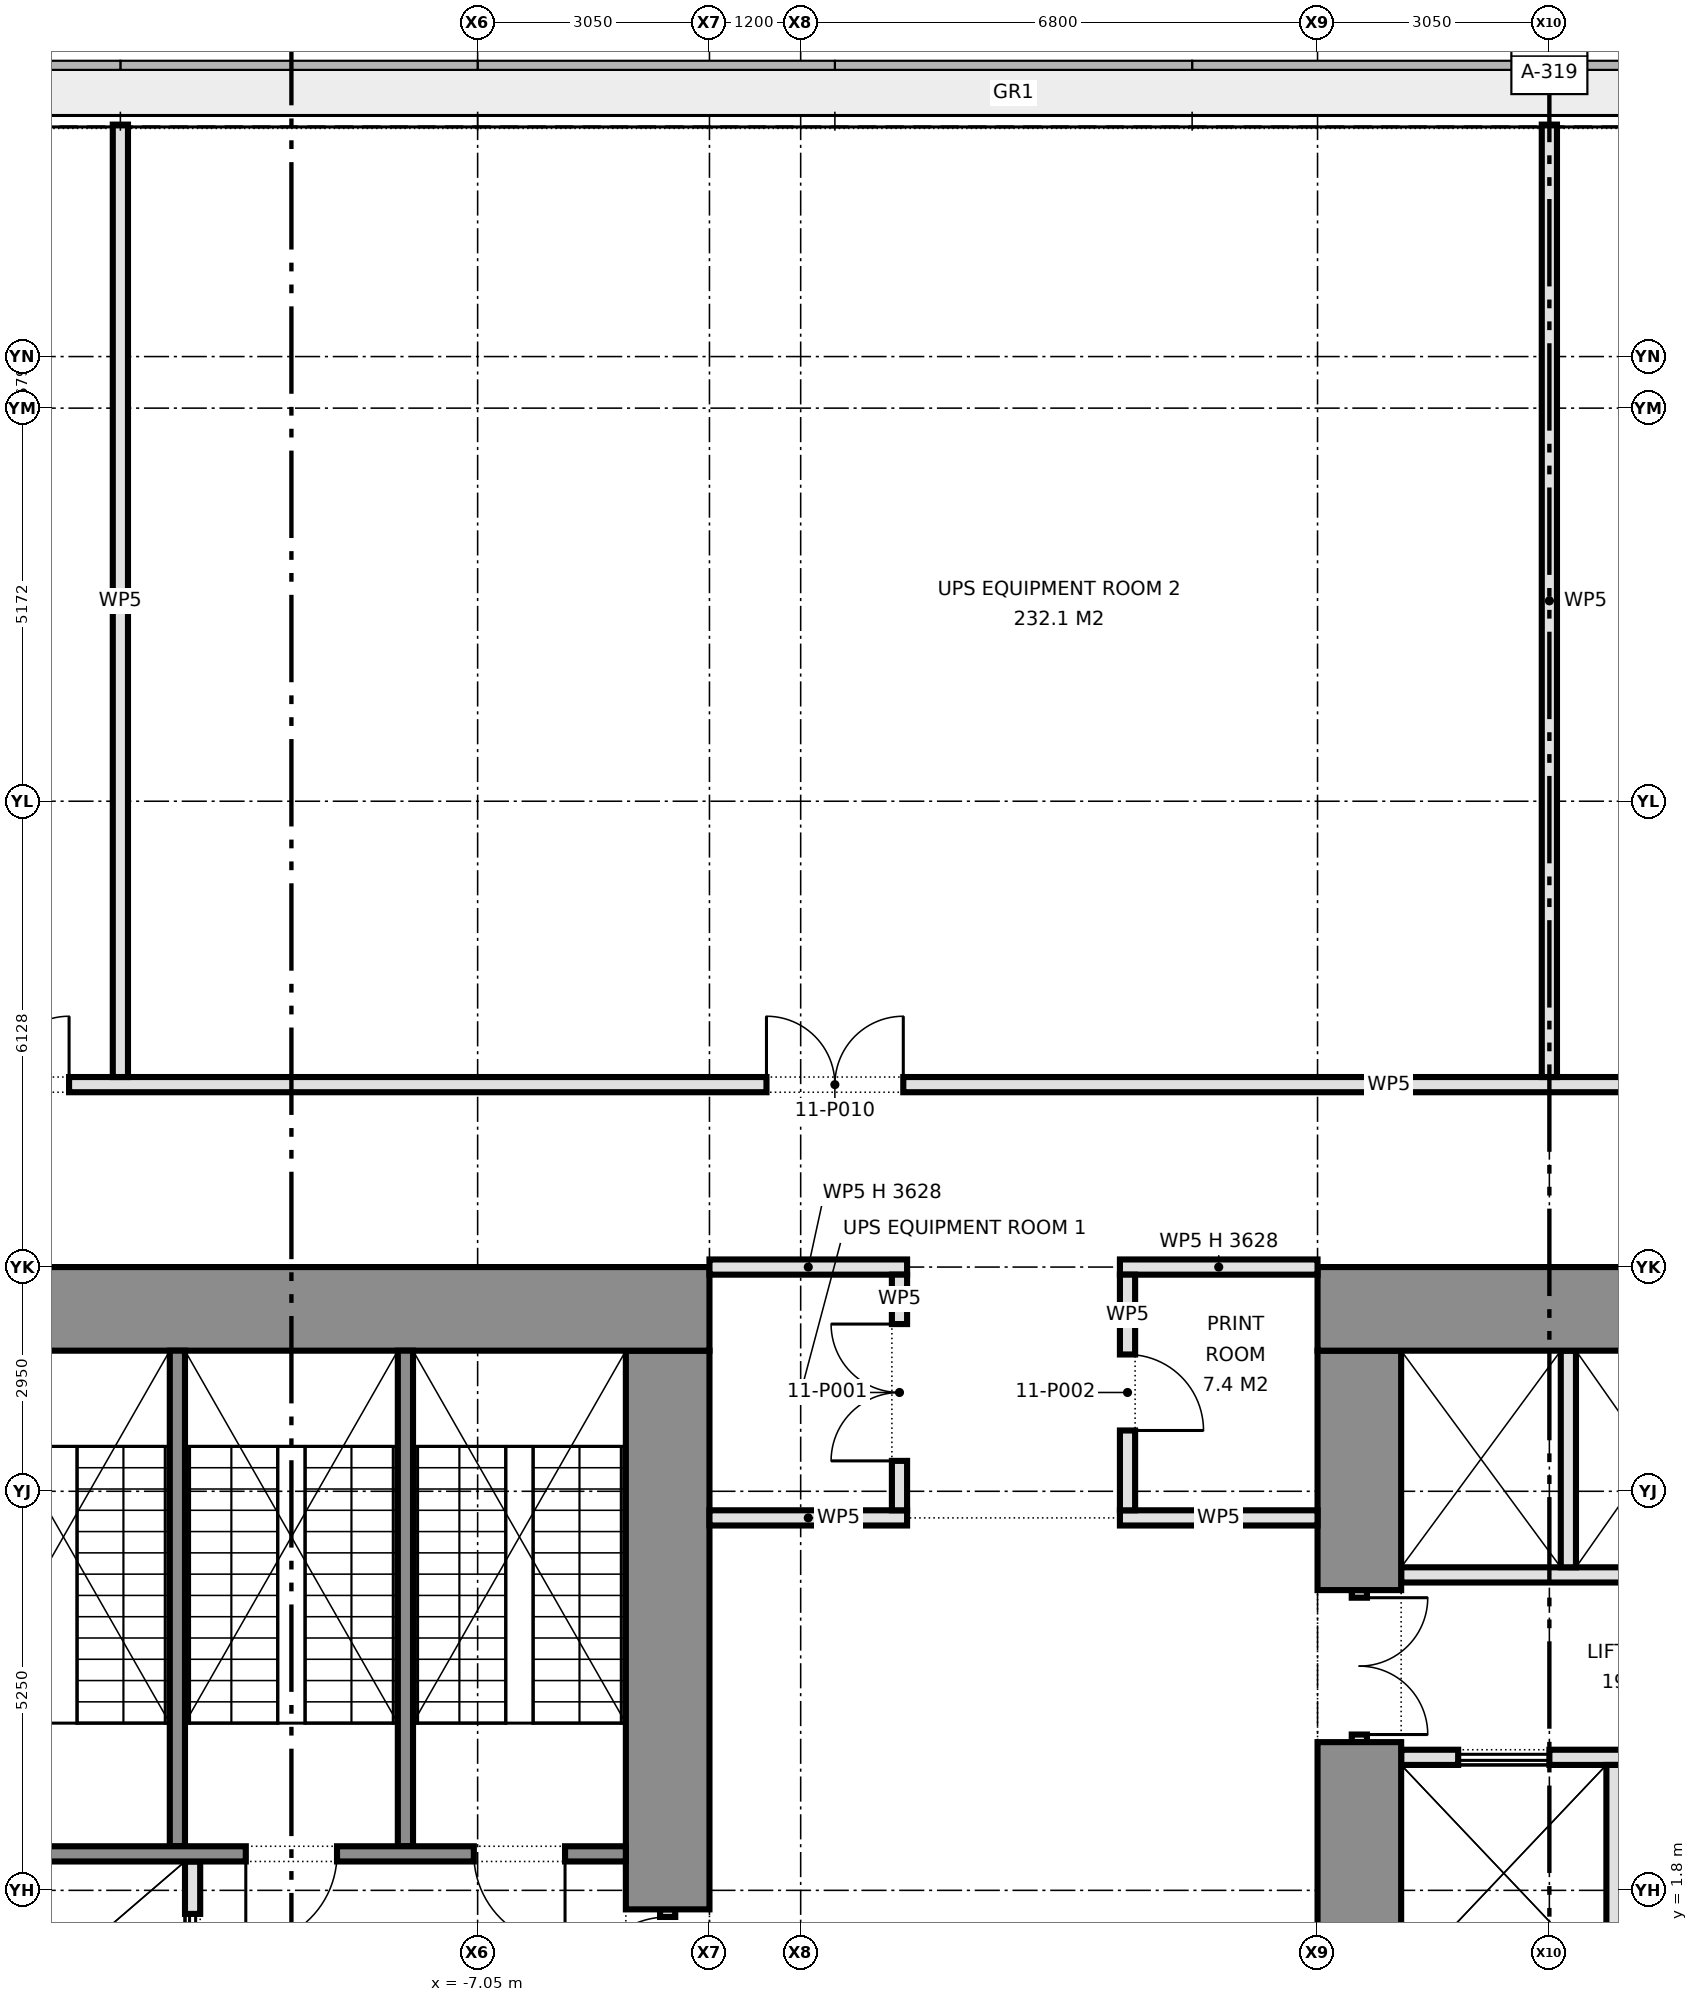
"""IFC4 building model, lengths in metres.
Left out: names, types, materials, properties, quantities, classifications, styles, units other than length and angle.
Written with IfcOpenShell. Run it as: python <this file> out.ifc"""

import sys

from ifc_helpers import new_model, si_unit, direction, frame, frame_2d, origin, place, context, subcontext, project, spatial, rectangle, extrude, element, fill, save


model = new_model("IFC4")
c1 = context("Model", 3, precision=1e-05, world=origin(), true_north=direction((0.0, 1.0)))
c2 = subcontext(c1, "Body", "Model", "MODEL_VIEW")
j1 = project(units=[si_unit("LENGTHUNIT", "METRE"), si_unit("PLANEANGLEUNIT", "RADIAN")], contexts=[c1])
p1 = place(None, origin())
s1 = spatial("IfcSite", under=j1, at=p1, CompositionType="ELEMENT")
p2 = place(p1, origin())
s2 = spatial("IfcBuilding", under=s1, at=p2, CompositionType="ELEMENT")
p3 = place(p2, frame((0.0, 0.0, 49.7)))
s3 = spatial("IfcBuildingStorey", under=s2, at=p3, CompositionType="ELEMENT", Elevation=49.7)
p4 = place(p3, frame((-15.0, 9.45, 0.0), z_axis=(0.0, 0.0, 1.0), x_axis=(1.0, 0.0, 0.0)))
e1 = element("IfcWall", 1, at=p4, inside=s3, PredefinedType="SHEAR", context=c2, shape_type="SweptSolid", body=[
    extrude(rectangle(XDim=11.0, YDim=1.1, at=frame_2d((5.5, 0.0))), origin(), (0.0, 0.0, 1.0), 4.575),
])
p5 = place(p3, frame((-4.55, 0.25, 0.0), z_axis=(0.0, 0.0, 1.0), x_axis=(0.0, 1.0, 0.0)))
e2 = element("IfcWall", 2, at=p5, inside=s3, PredefinedType="PARTITIONING", context=c2, shape_type="SweptSolid", body=[
    extrude(rectangle(XDim=1.3, YDim=0.2, at=frame_2d((0.65, 0.0))), origin(), (0.0, 0.0, 1.0), 2.4),
])
p6 = place(p5, frame((0.1, 0.0, 0.0)))
e3 = element("IfcOpeningElement", 3, at=p6, cuts=e2, PredefinedType="OPENING", context=c2, shape_type="SweptSolid", body=[
    extrude(rectangle(XDim=1.1, YDim=2.1, at=frame_2d((0.55, 1.05))), frame((0.0, 0.11, 0.0), z_axis=(0.0, -1.0, 0.0), x_axis=(1.0, 0.0, 0.0)), (0.0, 0.0, 1.0), 0.22),
])
p7 = place(p3, frame((-4.55, 1.55, 0.0), z_axis=(0.0, 0.0, 1.0), x_axis=(0.0, 1.0, 0.0)))
e4 = element("IfcWall", 4, at=p7, inside=s3, PredefinedType="SHEAR", context=c2, shape_type="SweptSolid", body=[
    extrude(rectangle(XDim=7.35, YDim=1.1, at=frame_2d((3.675, 0.0))), origin(), (0.0, 0.0, 1.0), 4.575),
])
p8 = place(p3, frame((-10.8, -0.4, 0.0), z_axis=(0.0, 0.0, 1.0), x_axis=(0.0, 1.0, 0.0)))
e5 = element("IfcWall", 5, at=p8, inside=s3, PredefinedType="PARTITIONING", context=c2, shape_type="SweptSolid", body=[
    extrude(rectangle(XDim=2.58, YDim=0.2, at=frame_2d((1.29, 0.0))), origin(), (0.0, 0.0, 1.0), 4.575),
])
p9 = place(p8, frame((0.69, 0.0, 0.0)))
e6 = element("IfcOpeningElement", 6, at=p9, cuts=e5, PredefinedType="OPENING", context=c2, shape_type="SweptSolid", body=[
    extrude(rectangle(XDim=1.2, YDim=2.1, at=frame_2d((0.6, 1.05))), frame((0.0, 0.11, 0.0), z_axis=(0.0, -1.0, 0.0), x_axis=(1.0, 0.0, 0.0)), (0.0, 0.0, 1.0), 0.22),
])
p10 = place(p3, frame((-13.9, 2.28, 0.0), z_axis=(0.0, 0.0, 1.0), x_axis=(1.0, 0.0, 0.0)))
e7 = element("IfcWall", 7, at=p10, inside=s3, PredefinedType="SHEAR", context=c2, shape_type="SweptSolid", body=[
    extrude(rectangle(XDim=8.8, YDim=0.2, at=frame_2d((4.4, 0.0))), origin(), (0.0, 0.0, 1.0), 4.575),
])
p11 = place(p10, frame((3.8, 0.0, 0.0)))
e8 = element("IfcOpeningElement", 8, at=p11, cuts=e7, PredefinedType="OPENING", context=c2, shape_type="SweptSolid", body=[
    extrude(rectangle(XDim=1.2, YDim=2.1, at=frame_2d((0.6, 1.05))), frame((0.0, 0.11, 0.0), z_axis=(0.0, -1.0, 0.0), x_axis=(1.0, 0.0, 0.0)), (0.0, 0.0, 1.0), 0.22),
])
p12 = place(p10, frame((6.8, 0.0, 0.0)))
e9 = element("IfcOpeningElement", 9, at=p12, cuts=e7, PredefinedType="OPENING", context=c2, shape_type="SweptSolid", body=[
    extrude(rectangle(XDim=1.2, YDim=2.1, at=frame_2d((0.6, 1.05))), frame((0.0, 0.11, 0.0), z_axis=(0.0, -1.0, 0.0), x_axis=(1.0, 0.0, 0.0)), (0.0, 0.0, 1.0), 0.22),
])
for number, where, z_axis, x_axis in (
    (10, (-11.0, 2.38, 0.0), (0.0, 0.0, 1.0), (0.0, 1.0, 0.0)),
    (11, (-8.0, 2.38, 0.0), (0.0, 0.0, 1.0), (0.0, 1.0, 0.0)),
):
    element("IfcWall", number, at=place(p3, frame(where, z_axis=z_axis, x_axis=x_axis)), inside=s3, PredefinedType="SHEAR", context=c2, shape_type="SweptSolid", body=[
        extrude(rectangle(XDim=6.52, YDim=0.2, at=frame_2d((3.26, 0.0))), origin(), (0.0, 0.0, 1.0), 4.575),
    ])
p13 = place(p3, frame((15.0, 9.45, 0.0), z_axis=(0.0, 0.0, 1.0), x_axis=(-1.0, 0.0, 0.0)))
e12 = element("IfcWall", 12, at=p13, inside=s3, PredefinedType="SHEAR", context=c2, shape_type="SweptSolid", body=[
    extrude(rectangle(XDim=11.0, YDim=1.1, at=frame_2d((5.5, 0.0))), origin(), (0.0, 0.0, 1.0), 4.575),
])
p14 = place(p3, frame((4.55, 8.9, 0.0), z_axis=(0.0, 0.0, 1.0), x_axis=(0.0, -1.0, 0.0)))
e13 = element("IfcWall", 13, at=p14, inside=s3, PredefinedType="SHEAR", context=c2, shape_type="SweptSolid", body=[
    extrude(rectangle(XDim=3.15, YDim=1.1, at=frame_2d((1.575, 0.0))), origin(), (0.0, 0.0, 1.0), 4.575),
])
p15 = place(p3, frame((4.55, 5.75, 0.0), z_axis=(0.0, 0.0, 1.0), x_axis=(0.0, -1.0, 0.0)))
e14 = element("IfcWall", 14, at=p15, inside=s3, PredefinedType="PARTITIONING", context=c2, shape_type="SweptSolid", body=[
    extrude(rectangle(XDim=2.0, YDim=0.2, at=frame_2d((1.0, 0.0))), origin(), (0.0, 0.0, 1.0), 2.4),
])
p16 = place(p15, frame((0.1, 0.0, 0.0)))
e15 = element("IfcOpeningElement", 15, at=p16, cuts=e14, PredefinedType="OPENING", context=c2, shape_type="SweptSolid", body=[
    extrude(rectangle(XDim=1.8, YDim=2.1, at=frame_2d((0.9, 1.05))), frame((0.0, 0.11, 0.0), z_axis=(0.0, -1.0, 0.0), x_axis=(1.0, 0.0, 0.0)), (0.0, 0.0, 1.0), 0.22),
])
p17 = place(p3, frame((4.55, 3.75, 0.0), z_axis=(0.0, 0.0, 1.0), x_axis=(0.0, -1.0, 0.0)))
e16 = element("IfcWall", 16, at=p17, inside=s3, PredefinedType="SHEAR", context=c2, shape_type="SweptSolid", body=[
    extrude(rectangle(XDim=4.0, YDim=1.1, at=frame_2d((2.0, 0.0))), origin(), (0.0, 0.0, 1.0), 4.575),
])
p18 = place(p3, frame((13.9, 5.95, 0.0), z_axis=(0.0, 0.0, 1.0), x_axis=(-1.0, 0.0, 0.0)))
e17 = element("IfcWall", 17, at=p18, inside=s3, PredefinedType="PARTITIONING", context=c2, shape_type="SweptSolid", body=[
    extrude(rectangle(XDim=8.8, YDim=0.2, at=frame_2d((4.4, 0.0))), origin(), (0.0, 0.0, 1.0), 4.575),
])
p19 = place(p18, frame((1.7, 0.0, 0.0)))
e18 = element("IfcOpeningElement", 18, at=p19, cuts=e17, PredefinedType="OPENING", context=c2, shape_type="SweptSolid", body=[
    extrude(rectangle(XDim=0.9, YDim=2.1, at=frame_2d((0.45, 1.05))), frame((0.0, 0.11, 0.0), z_axis=(0.0, -1.0, 0.0), x_axis=(1.0, 0.0, 0.0)), (0.0, 0.0, 1.0), 0.22),
])
p20 = place(p3, frame((13.9, 3.55, 0.0), z_axis=(0.0, 0.0, 1.0), x_axis=(-1.0, 0.0, 0.0)))
e19 = element("IfcWall", 19, at=p20, inside=s3, PredefinedType="PARTITIONING", context=c2, shape_type="SweptSolid", body=[
    extrude(rectangle(XDim=8.8, YDim=0.2, at=frame_2d((4.4, 0.0))), origin(), (0.0, 0.0, 1.0), 4.575),
])
p21 = place(p20, frame((0.65, 0.0, 0.0)))
e20 = element("IfcOpeningElement", 20, at=p21, cuts=e19, PredefinedType="OPENING", context=c2, shape_type="SweptSolid", body=[
    extrude(rectangle(XDim=1.8, YDim=2.1, at=frame_2d((0.9, 1.05))), frame((0.0, 0.11, 0.0), z_axis=(0.0, -1.0, 0.0), x_axis=(1.0, 0.0, 0.0)), (0.0, 0.0, 1.0), 0.22),
])
p22 = place(p20, frame((4.0, 0.0, 0.0)))
e21 = element("IfcOpeningElement", 21, at=p22, cuts=e19, PredefinedType="OPENING", context=c2, shape_type="SweptSolid", body=[
    extrude(rectangle(XDim=1.2, YDim=2.1, at=frame_2d((0.6, 1.05))), frame((0.0, 0.11, 0.0), z_axis=(0.0, -1.0, 0.0), x_axis=(1.0, 0.0, 0.0)), (0.0, 0.0, 1.0), 0.22),
])
p23 = place(p20, frame((6.85, 0.0, 0.0)))
e22 = element("IfcOpeningElement", 22, at=p23, cuts=e19, PredefinedType="OPENING", context=c2, shape_type="SweptSolid", body=[
    extrude(rectangle(XDim=1.2, YDim=2.1, at=frame_2d((0.6, 1.05))), frame((0.0, 0.11, 0.0), z_axis=(0.0, -1.0, 0.0), x_axis=(1.0, 0.0, 0.0)), (0.0, 0.0, 1.0), 0.22),
])
for number, where, z_axis, x_axis in (
    (23, (7.3, 8.9, 0.0), (0.0, 0.0, 1.0), (0.0, -1.0, 0.0)),
    (24, (7.9, 3.45, 0.0), (0.0, 0.0, 1.0), (0.0, -1.0, 0.0)),
):
    element("IfcWall", number, at=place(p3, frame(where, z_axis=z_axis, x_axis=x_axis)), inside=s3, PredefinedType="PARTITIONING", context=c2, shape_type="SweptSolid", body=[
        extrude(rectangle(XDim=2.85, YDim=0.2, at=frame_2d((1.425, 0.0))), origin(), (0.0, 0.0, 1.0), 4.575),
    ])
for number, where, z_axis, x_axis in (
    (25, (-4.0, 6.7, 0.0), (0.0, 0.0, 1.0), (1.0, 0.0, 0.0)),
    (26, (1.4, 6.7, 0.0), (0.0, 0.0, 1.0), (1.0, 0.0, 0.0)),
):
    element("IfcWall", number, at=place(p3, frame(where, z_axis=z_axis, x_axis=x_axis)), inside=s3, PredefinedType="PARTITIONING", context=c2, shape_type="SweptSolid", body=[
        extrude(rectangle(XDim=2.6, YDim=0.2, at=frame_2d((1.3, 0.0))), origin(), (0.0, 0.0, 1.0), 4.575),
    ])
for number, where, z_axis, x_axis in (
    (27, (-4.0, 10.0, 0.0), (0.0, 0.0, 1.0), (1.0, 0.0, 0.0)),
    (28, (1.4, 10.0, 0.0), (0.0, 0.0, 1.0), (1.0, 0.0, 0.0)),
):
    element("IfcWall", number, at=place(p3, frame(where, z_axis=z_axis, x_axis=x_axis)), inside=s3, PredefinedType="PARTITIONING", context=c2, shape_type="SweptSolid", body=[
        extrude(rectangle(XDim=2.6, YDim=0.2, at=frame_2d((1.3, 0.0))), origin(), (0.0, 0.0, 1.0), 3.628),
    ])
p24 = place(p3, frame((-25.03, 12.4, 0.0), z_axis=(0.0, 0.0, 1.0), x_axis=(1.0, 0.0, 0.0)))
e29 = element("IfcWall", 29, at=p24, inside=s3, PredefinedType="PARTITIONING", context=c2, shape_type="SweptSolid", body=[
    extrude(rectangle(XDim=50.06, YDim=0.2, at=frame_2d((25.03, 0.0))), origin(), (0.0, 0.0, 1.0), 4.575),
])
p25 = place(p24, frame((10.805, 0.0, 0.0)))
e30 = element("IfcOpeningElement", 30, at=p25, cuts=e29, PredefinedType="OPENING", context=c2, shape_type="SweptSolid", body=[
    extrude(rectangle(XDim=1.8, YDim=2.1, at=frame_2d((0.9, 1.05))), frame((0.0, 0.11, 0.0), z_axis=(0.0, -1.0, 0.0), x_axis=(1.0, 0.0, 0.0)), (0.0, 0.0, 1.0), 0.22),
])
p26 = place(p24, frame((8.28, 0.0, 0.0)))
e31 = element("IfcOpeningElement", 31, at=p26, cuts=e29, PredefinedType="OPENING", context=c2, shape_type="SweptSolid", body=[
    extrude(rectangle(XDim=1.2, YDim=2.1, at=frame_2d((0.6, 1.05))), frame((0.0, 0.11, 0.0), z_axis=(0.0, -1.0, 0.0), x_axis=(1.0, 0.0, 0.0)), (0.0, 0.0, 1.0), 0.22),
])
p27 = place(p24, frame((21.78, 0.0, 0.0)))
e32 = element("IfcOpeningElement", 32, at=p27, cuts=e29, PredefinedType="OPENING", context=c2, shape_type="SweptSolid", body=[
    extrude(rectangle(XDim=1.8, YDim=2.1, at=frame_2d((0.9, 1.05))), frame((0.0, 0.11, 0.0), z_axis=(0.0, -1.0, 0.0), x_axis=(1.0, 0.0, 0.0)), (0.0, 0.0, 1.0), 0.22),
])
p28 = place(p24, frame((36.36, 0.0, 0.0)))
e33 = element("IfcOpeningElement", 33, at=p28, cuts=e29, PredefinedType="OPENING", context=c2, shape_type="SweptSolid", body=[
    extrude(rectangle(XDim=1.8, YDim=2.1, at=frame_2d((0.9, 1.05))), frame((0.0, 0.11, 0.0), z_axis=(0.0, -1.0, 0.0), x_axis=(1.0, 0.0, 0.0)), (0.0, 0.0, 1.0), 0.22),
])
p29 = place(p3, frame((7.05, 12.5, 0.0), z_axis=(0.0, 0.0, 1.0), x_axis=(0.0, 1.0, 0.0)))
e34 = element("IfcWall", 34, at=p29, inside=s3, PredefinedType="PARTITIONING", context=c2, shape_type="SweptSolid", body=[
    extrude(rectangle(XDim=12.53, YDim=0.2, at=frame_2d((6.265, 0.0))), origin(), (0.0, 0.0, 1.0), 4.575),
])
p30 = place(p3, frame((1.5, 6.8, 0.0), z_axis=(0.0, 0.0, 1.0), x_axis=(0.0, 1.0, 0.0)))
e35 = element("IfcWall", 35, at=p30, inside=s3, PredefinedType="PARTITIONING", context=c2, shape_type="SweptSolid", body=[
    extrude(rectangle(XDim=3.1, YDim=0.2, at=frame_2d((1.55, 0.0))), origin(), (0.0, 0.0, 1.0), 4.575),
])
p31 = place(p30, frame((1.05, 0.0, 0.0)))
e36 = element("IfcOpeningElement", 36, at=p31, cuts=e35, PredefinedType="OPENING", context=c2, shape_type="SweptSolid", body=[
    extrude(rectangle(XDim=1.0, YDim=2.1, at=frame_2d((0.5, 1.05))), frame((0.0, 0.11, 0.0), z_axis=(0.0, -1.0, 0.0), x_axis=(1.0, 0.0, 0.0)), (0.0, 0.0, 1.0), 0.22),
])
p32 = place(p3, frame((-1.5, 6.8, 0.0), z_axis=(0.0, 0.0, 1.0), x_axis=(0.0, 1.0, 0.0)))
e37 = element("IfcWall", 37, at=p32, inside=s3, PredefinedType="PARTITIONING", context=c2, shape_type="SweptSolid", body=[
    extrude(rectangle(XDim=3.1, YDim=0.2, at=frame_2d((1.55, 0.0))), origin(), (0.0, 0.0, 1.0), 4.575),
])
p33 = place(p32, frame((0.65, 0.0, 0.0)))
e38 = element("IfcOpeningElement", 38, at=p33, cuts=e37, PredefinedType="OPENING", context=c2, shape_type="SweptSolid", body=[
    extrude(rectangle(XDim=1.8, YDim=2.1, at=frame_2d((0.9, 1.05))), frame((0.0, 0.11, 0.0), z_axis=(0.0, -1.0, 0.0), x_axis=(1.0, 0.0, 0.0)), (0.0, 0.0, 1.0), 0.22),
])
p34 = place(p3, frame((-11.75, 12.5, 0.0), z_axis=(0.0, 0.0, 1.0), x_axis=(0.0, 1.0, 0.0)))
e39 = element("IfcWall", 39, at=p34, inside=s3, PredefinedType="PARTITIONING", context=c2, shape_type="SweptSolid", body=[
    extrude(rectangle(XDim=12.53, YDim=0.2, at=frame_2d((6.265, 0.0))), origin(), (0.0, 0.0, 1.0), 4.575),
])
p35 = place(p6, origin())
e40 = element("IfcDoor", 40, at=p35, inside=s3, OperationType="SINGLE_SWING_LEFT", PredefinedType="DOOR", context=c2, shape_type="SweptSolid", body=[
    extrude(rectangle(XDim=1.1, YDim=2.1, at=frame_2d((0.55, 1.05))), frame((0.0, 0.025, 0.0), z_axis=(0.0, -1.0, 0.0), x_axis=(1.0, 0.0, 0.0)), (0.0, 0.0, 1.0), 0.05),
])
fill(e3, e40)
p36 = place(p9, origin())
e41 = element("IfcDoor", 41, at=p36, inside=s3, OperationType="DOUBLE_DOOR_SLIDING", PredefinedType="DOOR", context=c2, shape_type="SweptSolid", body=[
    extrude(rectangle(XDim=1.2, YDim=2.1, at=frame_2d((0.6, 1.05))), frame((0.0, 0.025, 0.0), z_axis=(0.0, -1.0, 0.0), x_axis=(1.0, 0.0, 0.0)), (0.0, 0.0, 1.0), 0.05),
])
fill(e6, e41)
p37 = place(p11, frame((1.2, 0.0, 0.0), z_axis=(0.0, 0.0, 1.0), x_axis=(-1.0, 0.0, 0.0)))
e42 = element("IfcDoor", 42, at=p37, inside=s3, OperationType="SINGLE_SWING_RIGHT", PredefinedType="DOOR", context=c2, shape_type="SweptSolid", body=[
    extrude(rectangle(XDim=1.2, YDim=2.1, at=frame_2d((0.6, 1.05))), frame((0.0, 0.025, 0.0), z_axis=(0.0, -1.0, 0.0), x_axis=(1.0, 0.0, 0.0)), (0.0, 0.0, 1.0), 0.05),
])
fill(e8, e42)
p38 = place(p12, frame((1.2, 0.0, 0.0), z_axis=(0.0, 0.0, 1.0), x_axis=(-1.0, 0.0, 0.0)))
e43 = element("IfcDoor", 43, at=p38, inside=s3, OperationType="SINGLE_SWING_LEFT", PredefinedType="DOOR", context=c2, shape_type="SweptSolid", body=[
    extrude(rectangle(XDim=1.2, YDim=2.1, at=frame_2d((0.6, 1.05))), frame((0.0, 0.025, 0.0), z_axis=(0.0, -1.0, 0.0), x_axis=(1.0, 0.0, 0.0)), (0.0, 0.0, 1.0), 0.05),
])
fill(e9, e43)
p39 = place(p16, origin())
e44 = element("IfcDoor", 44, at=p39, inside=s3, OperationType="DOUBLE_DOOR_SINGLE_SWING", PredefinedType="DOOR", context=c2, shape_type="SweptSolid", body=[
    extrude(rectangle(XDim=1.8, YDim=2.1, at=frame_2d((0.9, 1.05))), frame((0.0, 0.025, 0.0), z_axis=(0.0, -1.0, 0.0), x_axis=(1.0, 0.0, 0.0)), (0.0, 0.0, 1.0), 0.05),
])
fill(e15, e44)
p40 = place(p23, origin())
e45 = element("IfcDoor", 45, at=p40, inside=s3, OperationType="DOUBLE_DOOR_SLIDING", PredefinedType="DOOR", context=c2, shape_type="SweptSolid", body=[
    extrude(rectangle(XDim=1.2, YDim=2.1, at=frame_2d((0.6, 1.05))), frame((0.0, 0.025, 0.0), z_axis=(0.0, -1.0, 0.0), x_axis=(1.0, 0.0, 0.0)), (0.0, 0.0, 1.0), 0.05),
])
fill(e22, e45)
p41 = place(p33, origin())
e46 = element("IfcDoor", 46, at=p41, inside=s3, OperationType="DOUBLE_DOOR_SINGLE_SWING", PredefinedType="DOOR", context=c2, shape_type="SweptSolid", body=[
    extrude(rectangle(XDim=1.8, YDim=2.1, at=frame_2d((0.9, 1.05))), frame((0.0, 0.025, 0.0), z_axis=(0.0, -1.0, 0.0), x_axis=(1.0, 0.0, 0.0)), (0.0, 0.0, 1.0), 0.05),
])
fill(e38, e46)
p42 = place(p31, frame((1.0, 0.0, 0.0), z_axis=(0.0, 0.0, 1.0), x_axis=(-1.0, 0.0, 0.0)))
e47 = element("IfcDoor", 47, at=p42, inside=s3, OperationType="SINGLE_SWING_RIGHT", PredefinedType="DOOR", context=c2, shape_type="SweptSolid", body=[
    extrude(rectangle(XDim=1.0, YDim=2.1, at=frame_2d((0.5, 1.05))), frame((0.0, 0.025, 0.0), z_axis=(0.0, -1.0, 0.0), x_axis=(1.0, 0.0, 0.0)), (0.0, 0.0, 1.0), 0.05),
])
fill(e36, e47)
p43 = place(p25, origin())
e48 = element("IfcDoor", 48, at=p43, inside=s3, OperationType="DOUBLE_DOOR_SINGLE_SWING", PredefinedType="DOOR", context=c2, shape_type="SweptSolid", body=[
    extrude(rectangle(XDim=1.8, YDim=2.1, at=frame_2d((0.9, 1.05))), frame((0.0, 0.025, 0.0), z_axis=(0.0, -1.0, 0.0), x_axis=(1.0, 0.0, 0.0)), (0.0, 0.0, 1.0), 0.05),
])
fill(e30, e48)
p44 = place(p27, origin())
e49 = element("IfcDoor", 49, at=p44, inside=s3, OperationType="DOUBLE_DOOR_SINGLE_SWING", PredefinedType="DOOR", context=c2, shape_type="SweptSolid", body=[
    extrude(rectangle(XDim=1.8, YDim=2.1, at=frame_2d((0.9, 1.05))), frame((0.0, 0.025, 0.0), z_axis=(0.0, -1.0, 0.0), x_axis=(1.0, 0.0, 0.0)), (0.0, 0.0, 1.0), 0.05),
])
fill(e32, e49)
save(model, sys.argv[1])
